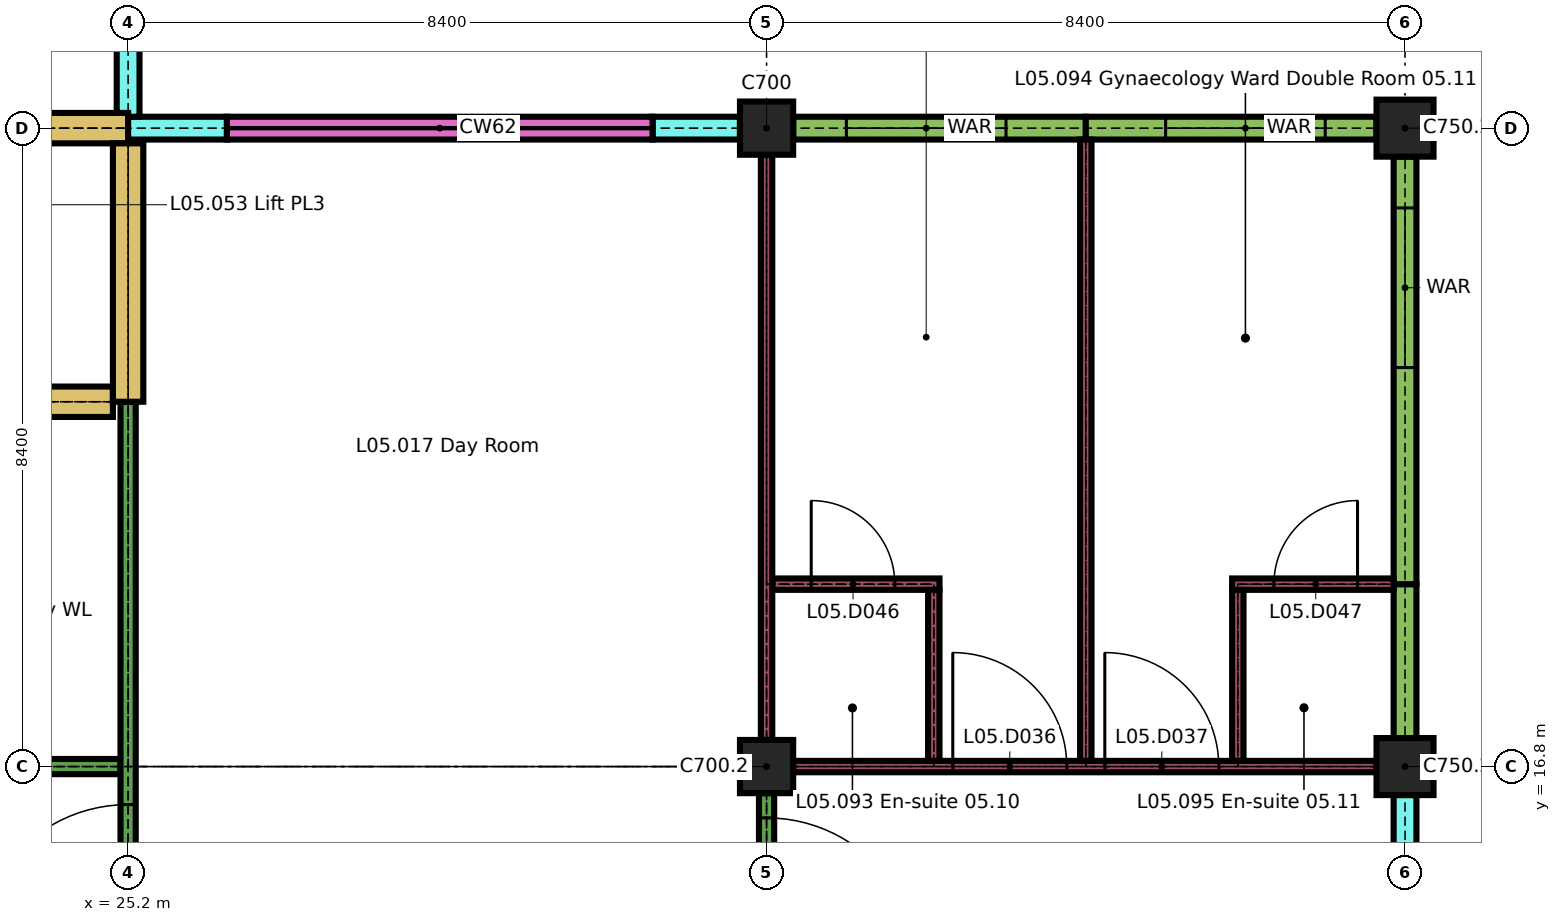
"""IFC4 building model, lengths in metres.
Left out: names, types, materials, properties, quantities, classifications, styles, units other than length and angle.
Written with IfcOpenShell. Run it as: python <this file> out.ifc"""

import sys

from ifc_helpers import new_model, si_unit, direction, frame, frame_2d, origin, origin_2d, place, context, subcontext, project, spatial, rectangle, extrude, element, fill, save


model = new_model("IFC4")
c1 = context("Model", 3, precision=1e-05, world=origin(), true_north=direction((0.0, 1.0)))
c2 = subcontext(c1, "Body", "Model", "MODEL_VIEW")
j1 = project(units=[si_unit("LENGTHUNIT", "METRE"), si_unit("PLANEANGLEUNIT", "RADIAN")], contexts=[c1])
p1 = place(None, origin())
s1 = spatial("IfcSite", under=j1, at=p1, CompositionType="ELEMENT")
p2 = place(p1, origin())
s2 = spatial("IfcBuilding", under=s1, at=p2, CompositionType="ELEMENT")
p3 = place(p2, frame((0.0, 0.0, 22.5)))
s3 = spatial("IfcBuildingStorey", under=s2, at=p3, CompositionType="ELEMENT", Elevation=22.5)
p4 = place(p3, frame((33.6, 16.8, 0.0), z_axis=(0.0, 0.0, 1.0), x_axis=(1.0, 0.0, 0.0)))
e1 = element("IfcColumn", 1, at=p4, inside=s3, PredefinedType="COLUMN", context=c2, shape_type="SweptSolid", body=[
    extrude(rectangle(XDim=0.7, YDim=0.7, at=origin_2d()), origin(), (0.0, 0.0, 1.0), 3.26),
])
p5 = place(p3, frame((42.0, 16.8, 0.0), z_axis=(0.0, 0.0, 1.0), x_axis=(1.0, 0.0, 0.0)))
e2 = element("IfcColumn", 2, at=p5, inside=s3, PredefinedType="COLUMN", context=c2, shape_type="SweptSolid", body=[
    extrude(rectangle(XDim=0.75, YDim=0.75, at=origin_2d()), origin(), (0.0, 0.0, 1.0), 3.26),
])
p6 = place(p3, frame((33.6, 25.2, 0.0), z_axis=(0.0, 0.0, 1.0), x_axis=(1.0, 0.0, 0.0)))
e3 = element("IfcColumn", 3, at=p6, inside=s3, PredefinedType="COLUMN", context=c2, shape_type="SweptSolid", body=[
    extrude(rectangle(XDim=0.7, YDim=0.7, at=origin_2d()), origin(), (0.0, 0.0, 1.0), 3.26),
])
p7 = place(p3, frame((42.0, 25.2, 0.0), z_axis=(0.0, 0.0, 1.0), x_axis=(1.0, 0.0, 0.0)))
e4 = element("IfcColumn", 4, at=p7, inside=s3, PredefinedType="COLUMN", context=c2, shape_type="SweptSolid", body=[
    extrude(rectangle(XDim=0.75, YDim=0.75, at=origin_2d()), origin(), (0.0, 0.0, 1.0), 3.26),
])
p8 = place(p3, frame((25.05, 25.2, 0.0), z_axis=(0.0, 0.0, 1.0), x_axis=(1.0, 0.0, 0.0)))
e5 = element("IfcWall", 5, at=p8, inside=s3, PredefinedType="SOLIDWALL", context=c2, shape_type="SweptSolid", body=[
    extrude(rectangle(XDim=1.45, YDim=0.3, at=frame_2d((0.725, 0.0))), origin(), (0.0, 0.0, 1.0), 3.26),
])
p9 = place(p3, frame((32.1, 25.2, 0.0), z_axis=(0.0, 0.0, 1.0), x_axis=(1.0, 0.0, 0.0)))
e6 = element("IfcWall", 6, at=p9, inside=s3, PredefinedType="SOLIDWALL", context=c2, shape_type="SweptSolid", body=[
    extrude(rectangle(XDim=1.15, YDim=0.3, at=frame_2d((0.575, 0.0))), origin(), (0.0, 0.0, 1.0), 3.26),
])
p10 = place(p3, frame((26.5, 25.2, 0.0), z_axis=(0.0, 0.0, 1.0), x_axis=(1.0, 0.0, 0.0)))
e7 = element("IfcWall", 7, at=p10, inside=s3, PredefinedType="SOLIDWALL", context=c2, shape_type="SweptSolid", body=[
    extrude(rectangle(XDim=5.6, YDim=0.3, at=frame_2d((2.8, 0.0))), origin(), (0.0, 0.0, 1.0), 0.6),
])
p11 = place(p3, frame((33.95, 25.2, 0.0), z_axis=(0.0, 0.0, 1.0), x_axis=(1.0, 0.0, 0.0)))
e8 = element("IfcWall", 8, at=p11, inside=s3, PredefinedType="SOLIDWALL", context=c2, shape_type="SweptSolid", body=[
    extrude(rectangle(XDim=3.85, YDim=0.3, at=frame_2d((1.925, 0.0))), origin(), (0.0, 0.0, 1.0), 2.96),
])
p12 = place(p11, frame((0.7, 0.0, 0.9)))
e9 = element("IfcOpeningElement", 9, at=p12, cuts=e8, PredefinedType="OPENING", context=c2, shape_type="SweptSolid", body=[
    extrude(rectangle(XDim=2.1, YDim=1.5, at=frame_2d((1.05, 0.75))), frame((0.0, 0.16, 0.0), z_axis=(0.0, -1.0, 0.0), x_axis=(1.0, 0.0, 0.0)), (0.0, 0.0, 1.0), 0.32),
])
p13 = place(p3, frame((37.8, 25.2, 0.0), z_axis=(0.0, 0.0, 1.0), x_axis=(1.0, 0.0, 0.0)))
e10 = element("IfcWall", 10, at=p13, inside=s3, PredefinedType="SOLIDWALL", context=c2, shape_type="SweptSolid", body=[
    extrude(rectangle(XDim=3.825, YDim=0.3, at=frame_2d((1.913, 0.0))), origin(), (0.0, 0.0, 1.0), 2.96),
])
p14 = place(p13, frame((1.05, 0.0, 0.9)))
e11 = element("IfcOpeningElement", 11, at=p14, cuts=e10, PredefinedType="OPENING", context=c2, shape_type="SweptSolid", body=[
    extrude(rectangle(XDim=2.1, YDim=1.5, at=frame_2d((1.05, 0.75))), frame((0.0, 0.16, 0.0), z_axis=(0.0, -1.0, 0.0), x_axis=(1.0, 0.0, 0.0)), (0.0, 0.0, 1.0), 0.32),
])
p15 = place(p3, frame((25.2, 25.35, 0.0), z_axis=(0.0, 0.0, 1.0), x_axis=(0.0, 1.0, 0.0)))
e12 = element("IfcWall", 12, at=p15, inside=s3, PredefinedType="SOLIDWALL", context=c2, shape_type="SweptSolid", body=[
    extrude(rectangle(XDim=4.05, YDim=0.3, at=frame_2d((2.025, 0.0))), origin(), (0.0, 0.0, 1.0), 3.26),
])
p16 = place(p15, frame((0.9, 0.0, 0.9)))
e13 = element("IfcOpeningElement", 13, at=p16, cuts=e12, PredefinedType="OPENING", context=c2, shape_type="SweptSolid", body=[
    extrude(rectangle(XDim=2.1, YDim=1.5, at=frame_2d((1.05, 0.75))), frame((0.0, 0.16, 0.0), z_axis=(0.0, -1.0, 0.0), x_axis=(1.0, 0.0, 0.0)), (0.0, 0.0, 1.0), 0.32),
])
p17 = place(p3, frame((42.0, 13.8, 0.0), z_axis=(0.0, 0.0, 1.0), x_axis=(0.0, 1.0, 0.0)))
e14 = element("IfcWall", 14, at=p17, inside=s3, PredefinedType="SOLIDWALL", context=c2, shape_type="SweptSolid", body=[
    extrude(rectangle(XDim=2.625, YDim=0.3, at=frame_2d((1.312, 0.0))), origin(), (0.0, 0.0, 1.0), 3.26),
])
p18 = place(p17, frame((0.45, 0.0, 0.9)))
e15 = element("IfcOpeningElement", 15, at=p18, cuts=e14, PredefinedType="OPENING", context=c2, shape_type="SweptSolid", body=[
    extrude(rectangle(XDim=0.9, YDim=1.5, at=frame_2d((0.45, 0.75))), frame((0.0, 0.16, 0.0), z_axis=(0.0, -1.0, 0.0), x_axis=(1.0, 0.0, 0.0)), (0.0, 0.0, 1.0), 0.32),
])
p19 = place(p3, frame((42.0, 17.175, 0.0), z_axis=(0.0, 0.0, 1.0), x_axis=(0.0, 1.0, 0.0)))
e16 = element("IfcWall", 16, at=p19, inside=s3, PredefinedType="SOLIDWALL", context=c2, shape_type="SweptSolid", body=[
    extrude(rectangle(XDim=2.025, YDim=0.3, at=frame_2d((1.012, 0.0))), origin(), (0.0, 0.0, 1.0), 2.96),
])
p20 = place(p3, frame((42.0, 19.2, 0.0), z_axis=(0.0, 0.0, 1.0), x_axis=(0.0, 1.0, 0.0)))
e17 = element("IfcWall", 17, at=p20, inside=s3, PredefinedType="SOLIDWALL", context=c2, shape_type="SweptSolid", body=[
    extrude(rectangle(XDim=5.625, YDim=0.3, at=frame_2d((2.812, 0.0))), origin(), (0.0, 0.0, 1.0), 2.96),
])
p21 = place(p20, frame((2.85, 0.0, 0.9)))
e18 = element("IfcOpeningElement", 18, at=p21, cuts=e17, PredefinedType="OPENING", context=c2, shape_type="SweptSolid", body=[
    extrude(rectangle(XDim=2.1, YDim=1.5, at=frame_2d((1.05, 0.75))), frame((0.0, 0.16, 0.0), z_axis=(0.0, -1.0, 0.0), x_axis=(1.0, 0.0, 0.0)), (0.0, 0.0, 1.0), 0.32),
])
p22 = place(p3, frame((16.7, 16.8, 0.0), z_axis=(0.0, 0.0, 1.0), x_axis=(1.0, 0.0, 0.0)))
e19 = element("IfcWall", 19, at=p22, inside=s3, PredefinedType="PARTITIONING", context=c2, shape_type="SweptSolid", body=[
    extrude(rectangle(XDim=8.4, YDim=0.2, at=frame_2d((4.2, 0.0))), origin(), (0.0, 0.0, 1.0), 3.26),
])
p23 = place(p22, frame((3.25, 0.0, 0.0)))
e20 = element("IfcOpeningElement", 20, at=p23, cuts=e19, PredefinedType="OPENING", context=c2, shape_type="SweptSolid", body=[
    extrude(rectangle(XDim=2.0, YDim=2.4, at=frame_2d((1.0, 1.2))), frame((0.0, 0.11, 0.0), z_axis=(0.0, -1.0, 0.0), x_axis=(1.0, 0.0, 0.0)), (0.0, 0.0, 1.0), 0.22),
])
p24 = place(p3, frame((33.95, 16.8, 0.0), z_axis=(0.0, 0.0, 1.0), x_axis=(1.0, 0.0, 0.0)))
e21 = element("IfcWall", 21, at=p24, inside=s3, PredefinedType="PARTITIONING", context=c2, shape_type="SweptSolid", body=[
    extrude(rectangle(XDim=7.675, YDim=0.15, at=frame_2d((3.837, 0.0))), origin(), (0.0, 0.0, 1.0), 3.26),
])
p25 = place(p24, frame((2.1, 0.0, 0.0)))
e22 = element("IfcOpeningElement", 22, at=p25, cuts=e21, PredefinedType="OPENING", context=c2, shape_type="SweptSolid", body=[
    extrude(rectangle(XDim=1.5, YDim=2.4, at=frame_2d((0.75, 1.2))), frame((0.0, 0.085, 0.0), z_axis=(0.0, -1.0, 0.0), x_axis=(1.0, 0.0, 0.0)), (0.0, 0.0, 1.0), 0.17),
])
p26 = place(p24, frame((4.1, 0.0, 0.0)))
e23 = element("IfcOpeningElement", 23, at=p26, cuts=e21, PredefinedType="OPENING", context=c2, shape_type="SweptSolid", body=[
    extrude(rectangle(XDim=1.5, YDim=2.4, at=frame_2d((0.75, 1.2))), frame((0.0, 0.085, 0.0), z_axis=(0.0, -1.0, 0.0), x_axis=(1.0, 0.0, 0.0)), (0.0, 0.0, 1.0), 0.17),
])
p27 = place(p3, frame((33.675, 19.2, 0.0), z_axis=(0.0, 0.0, 1.0), x_axis=(1.0, 0.0, 0.0)))
e24 = element("IfcWall", 24, at=p27, inside=s3, PredefinedType="PARTITIONING", context=c2, shape_type="SweptSolid", body=[
    extrude(rectangle(XDim=2.2, YDim=0.15, at=frame_2d((1.1, 0.0))), origin(), (0.0, 0.0, 1.0), 3.26),
])
p28 = place(p27, frame((0.512, 0.0, 0.0)))
e25 = element("IfcOpeningElement", 25, at=p28, cuts=e24, PredefinedType="OPENING", context=c2, shape_type="SweptSolid", body=[
    extrude(rectangle(XDim=1.1, YDim=2.1, at=frame_2d((0.55, 1.05))), frame((0.0, 0.085, 0.0), z_axis=(0.0, -1.0, 0.0), x_axis=(1.0, 0.0, 0.0)), (0.0, 0.0, 1.0), 0.17),
])
p29 = place(p3, frame((39.725, 19.2, 0.0), z_axis=(0.0, 0.0, 1.0), x_axis=(1.0, 0.0, 0.0)))
e26 = element("IfcWall", 26, at=p29, inside=s3, PredefinedType="PARTITIONING", context=c2, shape_type="SweptSolid", body=[
    extrude(rectangle(XDim=2.125, YDim=0.15, at=frame_2d((1.062, 0.0))), origin(), (0.0, 0.0, 1.0), 3.26),
])
p30 = place(p29, frame((0.55, 0.0, 0.0)))
e27 = element("IfcOpeningElement", 27, at=p30, cuts=e26, PredefinedType="OPENING", context=c2, shape_type="SweptSolid", body=[
    extrude(rectangle(XDim=1.1, YDim=2.1, at=frame_2d((0.55, 1.05))), frame((0.0, 0.085, 0.0), z_axis=(0.0, -1.0, 0.0), x_axis=(1.0, 0.0, 0.0)), (0.0, 0.0, 1.0), 0.17),
])
p31 = place(p3, frame((17.0, 21.6, 0.0), z_axis=(0.0, 0.0, 1.0), x_axis=(1.0, 0.0, 0.0)))
e28 = element("IfcWall", 28, at=p31, inside=s3, PredefinedType="SHEAR", context=c2, shape_type="SweptSolid", body=[
    extrude(rectangle(XDim=8.0, YDim=0.4, at=frame_2d((4.0, 0.0))), origin(), (0.0, 0.0, 1.0), 3.26),
])
p32 = place(p31, frame((1.35, 0.0, 0.0)))
e29 = element("IfcOpeningElement", 29, at=p32, cuts=e28, PredefinedType="OPENING", context=c2, shape_type="SweptSolid", body=[
    extrude(rectangle(XDim=1.3, YDim=2.1, at=frame_2d((0.65, 1.05))), frame((0.0, 0.21, 0.0), z_axis=(0.0, -1.0, 0.0), x_axis=(1.0, 0.0, 0.0)), (0.0, 0.0, 1.0), 0.42),
])
p33 = place(p31, frame((5.45, 0.0, 0.0)))
e30 = element("IfcOpeningElement", 30, at=p33, cuts=e28, PredefinedType="OPENING", context=c2, shape_type="SweptSolid", body=[
    extrude(rectangle(XDim=1.1, YDim=2.1, at=frame_2d((0.55, 1.05))), frame((0.0, 0.21, 0.0), z_axis=(0.0, -1.0, 0.0), x_axis=(1.0, 0.0, 0.0)), (0.0, 0.0, 1.0), 0.42),
])
p34 = place(p3, frame((17.0, 25.2, 0.0), z_axis=(0.0, 0.0, 1.0), x_axis=(1.0, 0.0, 0.0)))
e31 = element("IfcWall", 31, at=p34, inside=s3, PredefinedType="SHEAR", context=c2, shape_type="SweptSolid", body=[
    extrude(rectangle(XDim=8.2, YDim=0.4, at=frame_2d((4.1, 0.0))), origin(), (0.0, 0.0, 1.0), 3.26),
])
p35 = place(p3, frame((25.2, 8.75, 0.0), z_axis=(0.0, 0.0, 1.0), x_axis=(0.0, 1.0, 0.0)))
e32 = element("IfcWall", 32, at=p35, inside=s3, PredefinedType="PARTITIONING", context=c2, shape_type="SweptSolid", body=[
    extrude(rectangle(XDim=12.85, YDim=0.2, at=frame_2d((6.425, 0.0))), origin(), (0.0, 0.0, 1.0), 3.26),
])
p36 = place(p35, frame((0.325, 0.0, 0.0)))
e33 = element("IfcOpeningElement", 33, at=p36, cuts=e32, PredefinedType="OPENING", context=c2, shape_type="SweptSolid", body=[
    extrude(rectangle(XDim=2.0, YDim=2.4, at=frame_2d((1.0, 1.2))), frame((0.0, 0.11, 0.0), z_axis=(0.0, -1.0, 0.0), x_axis=(1.0, 0.0, 0.0)), (0.0, 0.0, 1.0), 0.22),
])
p37 = place(p35, frame((5.55, 0.0, 0.0)))
e34 = element("IfcOpeningElement", 34, at=p37, cuts=e32, PredefinedType="OPENING", context=c2, shape_type="SweptSolid", body=[
    extrude(rectangle(XDim=2.0, YDim=2.4, at=frame_2d((1.0, 1.2))), frame((0.0, 0.11, 0.0), z_axis=(0.0, -1.0, 0.0), x_axis=(1.0, 0.0, 0.0)), (0.0, 0.0, 1.0), 0.22),
])
p38 = place(p3, frame((25.2, 21.6, 0.0), z_axis=(0.0, 0.0, 1.0), x_axis=(0.0, 1.0, 0.0)))
e35 = element("IfcWall", 35, at=p38, inside=s3, PredefinedType="SHEAR", context=c2, shape_type="SweptSolid", body=[
    extrude(rectangle(XDim=3.4, YDim=0.4, at=frame_2d((1.7, 0.0))), origin(), (0.0, 0.0, 1.0), 3.26),
])
p39 = place(p3, frame((33.6, 3.6, 0.0), z_axis=(0.0, 0.0, 1.0), x_axis=(0.0, 1.0, 0.0)))
e36 = element("IfcWall", 36, at=p39, inside=s3, PredefinedType="PARTITIONING", context=c2, shape_type="SweptSolid", body=[
    extrude(rectangle(XDim=12.85, YDim=0.2, at=frame_2d((6.425, 0.0))), origin(), (0.0, 0.0, 1.0), 3.26),
])
p40 = place(p39, frame((5.3, 0.0, 0.0)))
e37 = element("IfcOpeningElement", 37, at=p40, cuts=e36, PredefinedType="OPENING", context=c2, shape_type="SweptSolid", body=[
    extrude(rectangle(XDim=2.0, YDim=2.4, at=frame_2d((1.0, 1.2))), frame((0.0, 0.11, 0.0), z_axis=(0.0, -1.0, 0.0), x_axis=(1.0, 0.0, 0.0)), (0.0, 0.0, 1.0), 0.22),
])
p41 = place(p39, frame((10.525, 0.0, 0.0)))
e38 = element("IfcOpeningElement", 38, at=p41, cuts=e36, PredefinedType="OPENING", context=c2, shape_type="SweptSolid", body=[
    extrude(rectangle(XDim=2.0, YDim=2.4, at=frame_2d((1.0, 1.2))), frame((0.0, 0.11, 0.0), z_axis=(0.0, -1.0, 0.0), x_axis=(1.0, 0.0, 0.0)), (0.0, 0.0, 1.0), 0.22),
])
p42 = place(p3, frame((33.6, 17.15, 0.0), z_axis=(0.0, 0.0, 1.0), x_axis=(0.0, 1.0, 0.0)))
e39 = element("IfcWall", 39, at=p42, inside=s3, PredefinedType="PARTITIONING", context=c2, shape_type="SweptSolid", body=[
    extrude(rectangle(XDim=7.7, YDim=0.15, at=frame_2d((3.85, 0.0))), origin(), (0.0, 0.0, 1.0), 3.26),
])
p43 = place(p3, frame((35.8, 16.875, 0.0), z_axis=(0.0, 0.0, 1.0), x_axis=(0.0, 1.0, 0.0)))
e40 = element("IfcWall", 40, at=p43, inside=s3, PredefinedType="PARTITIONING", context=c2, shape_type="SweptSolid", body=[
    extrude(rectangle(XDim=2.25, YDim=0.15, at=frame_2d((1.125, 0.0))), origin(), (0.0, 0.0, 1.0), 3.26),
])
p44 = place(p3, frame((37.8, 16.875, 0.0), z_axis=(0.0, 0.0, 1.0), x_axis=(0.0, 1.0, 0.0)))
e41 = element("IfcWall", 41, at=p44, inside=s3, PredefinedType="PARTITIONING", context=c2, shape_type="SweptSolid", body=[
    extrude(rectangle(XDim=8.175, YDim=0.15, at=frame_2d((4.087, 0.0))), origin(), (0.0, 0.0, 1.0), 3.26),
])
p45 = place(p3, frame((39.8, 16.875, 0.0), z_axis=(0.0, 0.0, 1.0), x_axis=(0.0, 1.0, 0.0)))
e42 = element("IfcWall", 42, at=p45, inside=s3, PredefinedType="PARTITIONING", context=c2, shape_type="SweptSolid", body=[
    extrude(rectangle(XDim=2.25, YDim=0.15, at=frame_2d((1.125, 0.0))), origin(), (0.0, 0.0, 1.0), 3.26),
])
p46 = place(p12, origin())
e43 = element("IfcWindow", 43, at=p46, inside=s3, PartitioningType="DOUBLE_PANEL_VERTICAL", PredefinedType="WINDOW", context=c2, shape_type="SweptSolid", body=[
    extrude(rectangle(XDim=2.1, YDim=1.5, at=frame_2d((1.05, 0.75))), frame((0.0, 0.05, 0.0), z_axis=(0.0, -1.0, 0.0), x_axis=(1.0, 0.0, 0.0)), (0.0, 0.0, 1.0), 0.1),
])
fill(e9, e43)
p47 = place(p14, origin())
e44 = element("IfcWindow", 44, at=p47, inside=s3, PartitioningType="DOUBLE_PANEL_VERTICAL", PredefinedType="WINDOW", context=c2, shape_type="SweptSolid", body=[
    extrude(rectangle(XDim=2.1, YDim=1.5, at=frame_2d((1.05, 0.75))), frame((0.0, 0.05, 0.0), z_axis=(0.0, -1.0, 0.0), x_axis=(1.0, 0.0, 0.0)), (0.0, 0.0, 1.0), 0.1),
])
fill(e11, e44)
p48 = place(p21, origin())
e45 = element("IfcWindow", 45, at=p48, inside=s3, PartitioningType="DOUBLE_PANEL_VERTICAL", PredefinedType="WINDOW", context=c2, shape_type="SweptSolid", body=[
    extrude(rectangle(XDim=2.1, YDim=1.5, at=frame_2d((1.05, 0.75))), frame((0.0, 0.05, 0.0), z_axis=(0.0, -1.0, 0.0), x_axis=(1.0, 0.0, 0.0)), (0.0, 0.0, 1.0), 0.1),
])
fill(e18, e45)
p49 = place(p25, origin())
e46 = element("IfcDoor", 46, at=p49, inside=s3, OperationType="SINGLE_SWING_RIGHT", PredefinedType="DOOR", context=c2, shape_type="SweptSolid", body=[
    extrude(rectangle(XDim=1.5, YDim=2.4, at=frame_2d((0.75, 1.2))), frame((0.0, 0.03, 0.0), z_axis=(0.0, -1.0, 0.0), x_axis=(1.0, 0.0, 0.0)), (0.0, 0.0, 1.0), 0.06),
])
fill(e22, e46)
p50 = place(p26, origin())
e47 = element("IfcDoor", 47, at=p50, inside=s3, OperationType="SINGLE_SWING_RIGHT", PredefinedType="DOOR", context=c2, shape_type="SweptSolid", body=[
    extrude(rectangle(XDim=1.5, YDim=2.4, at=frame_2d((0.75, 1.2))), frame((0.0, 0.03, 0.0), z_axis=(0.0, -1.0, 0.0), x_axis=(1.0, 0.0, 0.0)), (0.0, 0.0, 1.0), 0.06),
])
fill(e23, e47)
p51 = place(p28, origin())
e48 = element("IfcDoor", 48, at=p51, inside=s3, OperationType="SINGLE_SWING_RIGHT", PredefinedType="DOOR", context=c2, shape_type="SweptSolid", body=[
    extrude(rectangle(XDim=1.1, YDim=2.1, at=frame_2d((0.55, 1.05))), frame((0.0, 0.025, 0.0), z_axis=(0.0, -1.0, 0.0), x_axis=(1.0, 0.0, 0.0)), (0.0, 0.0, 1.0), 0.05),
])
fill(e25, e48)
p52 = place(p30, origin())
e49 = element("IfcDoor", 49, at=p52, inside=s3, OperationType="SINGLE_SWING_LEFT", PredefinedType="DOOR", context=c2, shape_type="SweptSolid", body=[
    extrude(rectangle(XDim=1.1, YDim=2.1, at=frame_2d((0.55, 1.05))), frame((0.0, 0.025, 0.0), z_axis=(0.0, -1.0, 0.0), x_axis=(1.0, 0.0, 0.0)), (0.0, 0.0, 1.0), 0.05),
])
fill(e27, e49)
p53 = place(p37, origin())
e50 = element("IfcDoor", 50, at=p53, inside=s3, OperationType="SINGLE_SWING_RIGHT", PredefinedType="DOOR", context=c2, shape_type="SweptSolid", body=[
    extrude(rectangle(XDim=2.0, YDim=2.4, at=frame_2d((1.0, 1.2))), frame((0.0, 0.03, 0.0), z_axis=(0.0, -1.0, 0.0), x_axis=(1.0, 0.0, 0.0)), (0.0, 0.0, 1.0), 0.06),
])
fill(e34, e50)
p54 = place(p41, origin())
e51 = element("IfcDoor", 51, at=p54, inside=s3, OperationType="SINGLE_SWING_LEFT", PredefinedType="DOOR", context=c2, shape_type="SweptSolid", body=[
    extrude(rectangle(XDim=2.0, YDim=2.4, at=frame_2d((1.0, 1.2))), frame((0.0, 0.03, 0.0), z_axis=(0.0, -1.0, 0.0), x_axis=(1.0, 0.0, 0.0)), (0.0, 0.0, 1.0), 0.06),
])
fill(e38, e51)
save(model, sys.argv[1])
